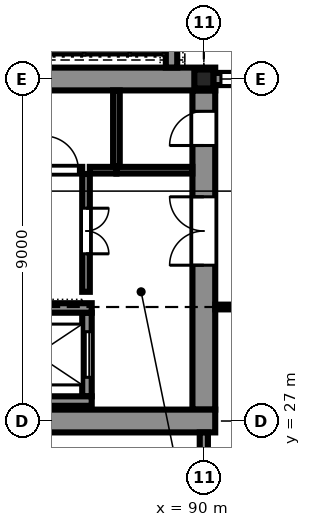
"""IFC4 building model, lengths in metres.
Left out: names, types, materials, properties, quantities, classifications, styles, units other than length and angle.
Written with IfcOpenShell. Run it as: python <this file> out.ifc"""

import sys

from ifc_helpers import new_model, si_unit, direction, frame, frame_2d, origin, origin_2d, place, context, subcontext, project, spatial, polyline, rectangle, hollow_rectangle, outline, extrude, element, fill, save


model = new_model("IFC4")
c1 = context("Model", 3, precision=1e-05, world=origin(), true_north=direction((0.0, 1.0)))
c2 = subcontext(c1, "Body", "Model", "MODEL_VIEW")
j1 = project(units=[si_unit("LENGTHUNIT", "METRE"), si_unit("PLANEANGLEUNIT", "RADIAN")], contexts=[c1])
p1 = place(None, origin())
s1 = spatial("IfcSite", under=j1, at=p1, CompositionType="ELEMENT")
p2 = place(p1, origin())
s2 = spatial("IfcBuilding", under=s1, at=p2, CompositionType="ELEMENT")
p3 = place(p2, origin())
s3 = spatial("IfcBuildingStorey", under=s2, at=p3, CompositionType="ELEMENT", Elevation=0.0)
p4 = place(p3, frame((90.0, 36.0, -2.1), z_axis=(0.0, 0.0, 1.0), x_axis=(1.0, 0.0, 0.0)))
e1 = element("IfcColumn", 1, at=p4, inside=s3, PredefinedType="COLUMN", context=c2, shape_type="SweptSolid", body=[
    extrude(hollow_rectangle(XDim=0.5, YDim=0.5, WallThickness=0.032, at=origin_2d()), origin(), (0.0, 0.0, 1.0), 9.6),
])
p5 = place(p3, frame((71.7, 27.0, -2.1), z_axis=(0.0, 0.0, 1.0), x_axis=(1.0, 0.0, 0.0)))
e2 = element("IfcWall", 2, at=p5, inside=s3, PredefinedType="SOLIDWALL", context=c2, shape_type="SweptSolid", body=[
    extrude(rectangle(XDim=18.6, YDim=0.6, at=frame_2d((9.3, 0.0))), origin(), (0.0, 0.0, 1.0), 9.6),
])
p6 = place(p3, frame((71.7, 36.0, -2.1), z_axis=(0.0, 0.0, 1.0), x_axis=(1.0, 0.0, 0.0)))
e3 = element("IfcWall", 3, at=p6, inside=s3, PredefinedType="SOLIDWALL", context=c2, shape_type="SweptSolid", body=[
    extrude(rectangle(XDim=18.6, YDim=0.6, at=frame_2d((9.3, 0.0))), origin(), (0.0, 0.0, 1.0), 9.6),
])
p7 = place(p6, frame((1.6, 0.0, 2.1)))
e4 = element("IfcOpeningElement", 4, at=p7, cuts=e3, PredefinedType="OPENING", context=c2, shape_type="SweptSolid", body=[
    extrude(rectangle(XDim=1.8, YDim=2.1, at=frame_2d((0.9, 1.05))), frame((0.0, 0.31, 0.0), z_axis=(0.0, -1.0, 0.0), x_axis=(1.0, 0.0, 0.0)), (0.0, 0.0, 1.0), 0.62),
])
p8 = place(p6, frame((5.6, 0.0, 2.1)))
e5 = element("IfcOpeningElement", 5, at=p8, cuts=e3, PredefinedType="OPENING", context=c2, shape_type="SweptSolid", body=[
    extrude(rectangle(XDim=1.8, YDim=2.1, at=frame_2d((0.9, 1.05))), frame((0.0, 0.31, 0.0), z_axis=(0.0, -1.0, 0.0), x_axis=(1.0, 0.0, 0.0)), (0.0, 0.0, 1.0), 0.62),
])
p9 = place(p6, frame((9.1, 0.0, 2.1)))
e6 = element("IfcOpeningElement", 6, at=p9, cuts=e3, PredefinedType="OPENING", context=c2, shape_type="SweptSolid", body=[
    extrude(rectangle(XDim=1.8, YDim=2.1, at=frame_2d((0.9, 1.05))), frame((0.0, 0.31, 0.0), z_axis=(0.0, -1.0, 0.0), x_axis=(1.0, 0.0, 0.0)), (0.0, 0.0, 1.0), 0.62),
])
p10 = place(p3, frame((90.0, 27.3, -2.1), z_axis=(0.0, 0.0, 1.0), x_axis=(0.0, 1.0, 0.0)))
e7 = element("IfcWall", 7, at=p10, inside=s3, PredefinedType="SOLIDWALL", context=c2, shape_type="SweptSolid", body=[
    extrude(rectangle(XDim=8.4, YDim=0.6, at=frame_2d((4.2, 0.0))), origin(), (0.0, 0.0, 1.0), 9.6),
])
p11 = place(p10, frame((3.8, 0.0, 2.1)))
e8 = element("IfcOpeningElement", 8, at=p11, cuts=e7, PredefinedType="OPENING", context=c2, shape_type="SweptSolid", body=[
    extrude(rectangle(XDim=1.8, YDim=2.1, at=frame_2d((0.9, 1.05))), frame((0.0, 0.31, 0.0), z_axis=(0.0, -1.0, 0.0), x_axis=(1.0, 0.0, 0.0)), (0.0, 0.0, 1.0), 0.62),
])
p12 = place(p10, frame((6.95, 0.0, 2.1)))
e9 = element("IfcOpeningElement", 9, at=p12, cuts=e7, PredefinedType="OPENING", context=c2, shape_type="SweptSolid", body=[
    extrude(rectangle(XDim=0.9, YDim=2.1, at=frame_2d((0.45, 1.05))), frame((0.0, 0.31, 0.0), z_axis=(0.0, -1.0, 0.0), x_axis=(1.0, 0.0, 0.0)), (0.0, 0.0, 1.0), 0.62),
])
p13 = place(p3, frame((90.25, 36.0, 0.0), z_axis=(0.0, 0.0, 1.0), x_axis=(1.0, 0.0, 0.0)))
e10 = element("IfcWall", 10, at=p13, inside=s3, PredefinedType="SOLIDWALL", context=c2, shape_type="SweptSolid", body=[
    extrude(rectangle(XDim=8.445, YDim=0.32, at=frame_2d((4.223, 0.0))), origin(), (0.0, 0.0, 1.0), 6.767),
])
p14 = place(p13, frame((3.05, 0.0, 0.0)))
e11 = element("IfcOpeningElement", 11, at=p14, cuts=e10, PredefinedType="OPENING", context=c2, shape_type="SweptSolid", body=[
    extrude(rectangle(XDim=2.4, YDim=3.0, at=frame_2d((1.2, 1.5))), frame((0.0, 0.17, 0.0), z_axis=(0.0, -1.0, 0.0), x_axis=(1.0, 0.0, 0.0)), (0.0, 0.0, 1.0), 0.34),
])
p15 = place(p13, frame((0.2, 0.0, 0.9)))
e12 = element("IfcOpeningElement", 12, at=p15, cuts=e10, PredefinedType="OPENING", context=c2, shape_type="SweptSolid", body=[
    extrude(rectangle(XDim=2.1, YDim=3.0, at=frame_2d((1.05, 1.5))), frame((0.0, 0.17, 0.0), z_axis=(0.0, -1.0, 0.0), x_axis=(1.0, 0.0, 0.0)), (0.0, 0.0, 1.0), 0.34),
])
p16 = place(p13, frame((6.2, 0.0, 0.9)))
e13 = element("IfcOpeningElement", 13, at=p16, cuts=e10, PredefinedType="OPENING", context=c2, shape_type="SweptSolid", body=[
    extrude(rectangle(XDim=2.1, YDim=3.0, at=frame_2d((1.05, 1.5))), frame((0.0, 0.17, 0.0), z_axis=(0.0, -1.0, 0.0), x_axis=(1.0, 0.0, 0.0)), (0.0, 0.0, 1.0), 0.34),
])
p17 = place(p3, frame((89.15, 36.302, 0.0), z_axis=(0.0, 0.0, 1.0), x_axis=(0.0, 1.0, 0.0)))
e14 = element("IfcWall", 14, at=p17, inside=s3, PredefinedType="SOLIDWALL", context=c2, shape_type="SweptSolid", body=[
    extrude(rectangle(XDim=8.098, YDim=0.3, at=frame_2d((4.049, 0.0))), origin(), (0.0, 0.0, 1.0), 6.902),
])
for number, where, z_axis, x_axis in (
    (15, (83.65, 27.525, -1.6), (0.0, 0.0, 1.0), (1.0, 0.0, 0.0)),
    (16, (83.65, 29.975, -1.6), (0.0, 0.0, 1.0), (1.0, 0.0, 0.0)),
):
    element("IfcWall", number, at=place(p3, frame(where, z_axis=z_axis, x_axis=x_axis)), inside=s3, PredefinedType="SOLIDWALL", context=c2, shape_type="SweptSolid", body=[
        extrude(rectangle(XDim=3.4, YDim=0.25, at=frame_2d((1.7, 0.0))), origin(), (0.0, 0.0, 1.0), 8.436),
    ])
p18 = place(p3, frame((86.925, 27.65, -1.6), z_axis=(0.0, 0.0, 1.0), x_axis=(0.0, 1.0, 0.0)))
e17 = element("IfcWall", 17, at=p18, inside=s3, PredefinedType="SOLIDWALL", context=c2, shape_type="SweptSolid", body=[
    extrude(rectangle(XDim=2.2, YDim=0.25, at=frame_2d((1.1, 0.0))), origin(), (0.0, 0.0, 1.0), 8.436),
])
p19 = place(p18, frame((0.5, 0.0, 1.6)))
e18 = element("IfcOpeningElement", 18, at=p19, cuts=e17, PredefinedType="OPENING", context=c2, shape_type="SweptSolid", body=[
    extrude(rectangle(XDim=1.2, YDim=2.1, at=frame_2d((0.6, 1.05))), frame((0.0, 0.135, 0.0), z_axis=(0.0, -1.0, 0.0), x_axis=(1.0, 0.0, 0.0)), (0.0, 0.0, 1.0), 0.27),
])
p20 = place(p3, frame((99.0, 30.0, 0.0), z_axis=(0.0, 0.0, 1.0), x_axis=(-1.0, 0.0, 0.0)))
e19 = element("IfcWall", 19, at=p20, inside=s3, PredefinedType="PARTITIONING", context=c2, shape_type="SweptSolid", body=[
    extrude(rectangle(XDim=8.698, YDim=0.125, at=frame_2d((4.349, 0.0))), origin(), (0.0, 0.0, 1.0), 6.757),
])
p21 = place(p20, frame((3.9, 0.0, 0.0)))
e20 = element("IfcOpeningElement", 20, at=p21, cuts=e19, PredefinedType="OPENING", context=c2, shape_type="SweptSolid", body=[
    extrude(rectangle(XDim=1.2, YDim=2.1, at=frame_2d((0.6, 1.05))), frame((0.0, 0.073, 0.0), z_axis=(0.0, -1.0, 0.0), x_axis=(1.0, 0.0, 0.0)), (0.0, 0.0, 1.0), 0.145),
])
p22 = place(p3, frame((90.0, 26.698, 0.0), z_axis=(0.0, 0.0, 1.0), x_axis=(0.0, -1.0, 0.0)))
e21 = element("IfcWall", 21, at=p22, inside=s3, PredefinedType="PARTITIONING", context=c2, shape_type="SweptSolid", body=[
    extrude(rectangle(XDim=5.591, YDim=0.215, at=frame_2d((2.795, 0.0))), origin(), (0.0, 0.0, 1.0), 6.6),
])
p23 = place(p3, frame((86.9, 33.5, 0.0), z_axis=(0.0, 0.0, 1.0), x_axis=(0.0, -1.0, 0.0)))
e22 = element("IfcWall", 22, at=p23, inside=s3, PredefinedType="PARTITIONING", context=c2, shape_type="SweptSolid", body=[
    extrude(rectangle(XDim=3.1, YDim=0.2, at=frame_2d((1.55, 0.0))), origin(), (0.0, 0.0, 1.0), 6.6),
])
p24 = place(p23, frame((0.9, 0.0, 0.0)))
e23 = element("IfcOpeningElement", 23, at=p24, cuts=e22, PredefinedType="OPENING", context=c2, shape_type="SweptSolid", body=[
    extrude(rectangle(XDim=1.2, YDim=2.1, at=frame_2d((0.6, 1.05))), frame((0.0, 0.11, 0.0), z_axis=(0.0, -1.0, 0.0), x_axis=(1.0, 0.0, 0.0)), (0.0, 0.0, 1.0), 0.22),
])
p25 = place(p3, frame((85.7, 33.6, 0.0), z_axis=(0.0, 0.0, 1.0), x_axis=(1.0, 0.0, 0.0)))
e24 = element("IfcWall", 24, at=p25, inside=s3, PredefinedType="PARTITIONING", context=c2, shape_type="SweptSolid", body=[
    extrude(rectangle(XDim=1.1, YDim=0.175, at=frame_2d((0.55, 0.0))), origin(), (0.0, 0.0, 1.0), 6.459),
])
p26 = place(p25, frame((0.1, 0.0, 0.0)))
e25 = element("IfcOpeningElement", 25, at=p26, cuts=e24, PredefinedType="OPENING", context=c2, shape_type="SweptSolid", body=[
    extrude(rectangle(XDim=0.9, YDim=2.1, at=frame_2d((0.45, 1.05))), frame((0.0, 0.097, 0.0), z_axis=(0.0, -1.0, 0.0), x_axis=(1.0, 0.0, 0.0)), (0.0, 0.0, 1.0), 0.195),
])
p27 = place(p3, frame((87.7, 33.6, 0.0), z_axis=(0.0, 0.0, 1.0), x_axis=(1.0, 0.0, 0.0)))
e26 = element("IfcWall", 26, at=p27, inside=s3, PredefinedType="PARTITIONING", context=c2, shape_type="SweptSolid", body=[
    extrude(rectangle(XDim=1.998, YDim=0.175, at=frame_2d((0.999, 0.0))), origin(), (0.0, 0.0, 1.0), 6.459),
])
p28 = place(p3, frame((87.0, 33.6, 0.0), z_axis=(0.0, 0.0, 1.0), x_axis=(1.0, 0.0, 0.0)))
e27 = element("IfcWall", 27, at=p28, inside=s3, PredefinedType="PARTITIONING", context=c2, shape_type="SweptSolid", body=[
    extrude(rectangle(XDim=0.7, YDim=0.175, at=frame_2d((0.35, 0.0))), origin(), (0.0, 0.0, 1.0), 6.459),
])
p29 = place(p3, frame((87.7, 35.698, 0.0), z_axis=(0.0, 0.0, 1.0), x_axis=(0.0, -1.0, 0.0)))
e28 = element("IfcWall", 28, at=p29, inside=s3, PredefinedType="PARTITIONING", context=c2, shape_type="SweptSolid", body=[
    extrude(rectangle(XDim=1.998, YDim=0.175, at=frame_2d((0.999, 0.0))), origin(), (0.0, 0.0, 1.0), 6.459),
])
p30 = place(p15, origin())
e29 = element("IfcWindow", 29, at=p30, inside=s3, PartitioningType="DOUBLE_PANEL_VERTICAL", PredefinedType="WINDOW", context=c2, shape_type="SweptSolid", body=[
    extrude(outline(polyline([(0.0, 0.0), (2.1, 0.0), (2.1, 3.0), (0.0, 3.0), (0.0, 0.0)]), holes=[polyline([(0.07, 0.07), (2.03, 0.07), (2.03, 2.93), (0.07, 2.93), (0.07, 0.07)])]), frame((0.0, 0.03, 0.0), z_axis=(0.0, -1.0, 0.0), x_axis=(1.0, 0.0, 0.0)), (0.0, 0.0, 1.0), 0.06),
    extrude(rectangle(XDim=0.04, YDim=2.86, at=frame_2d((1.05, 1.5))), frame((0.0, 0.022, 0.0), z_axis=(0.0, -1.0, 0.0), x_axis=(1.0, 0.0, 0.0)), (0.0, 0.0, 1.0), 0.044),
    extrude(outline(polyline([(0.07, 0.07), (1.03, 0.07), (1.03, 2.93), (0.07, 2.93), (0.07, 0.07)]), holes=[polyline([(0.1, 0.1), (1.0, 0.1), (1.0, 2.9), (0.1, 2.9), (0.1, 0.1)])]), frame((0.0, 0.022, 0.0), z_axis=(0.0, -1.0, 0.0), x_axis=(1.0, 0.0, 0.0)), (0.0, 0.0, 1.0), 0.045),
    extrude(rectangle(XDim=0.9, YDim=2.8, at=frame_2d((0.55, 1.5))), frame((0.0, 0.006, 0.0), z_axis=(0.0, -1.0, 0.0), x_axis=(1.0, 0.0, 0.0)), (0.0, 0.0, 1.0), 0.012),
    extrude(outline(polyline([(1.07, 0.07), (2.03, 0.07), (2.03, 2.93), (1.07, 2.93), (1.07, 0.07)]), holes=[polyline([(1.1, 0.1), (2.0, 0.1), (2.0, 2.9), (1.1, 2.9), (1.1, 0.1)])]), frame((0.0, 0.022, 0.0), z_axis=(0.0, -1.0, 0.0), x_axis=(1.0, 0.0, 0.0)), (0.0, 0.0, 1.0), 0.045),
    extrude(rectangle(XDim=0.9, YDim=2.8, at=frame_2d((1.55, 1.5))), frame((0.0, 0.006, 0.0), z_axis=(0.0, -1.0, 0.0), x_axis=(1.0, 0.0, 0.0)), (0.0, 0.0, 1.0), 0.012),
])
fill(e12, e29)
p31 = place(p19, origin())
e30 = element("IfcDoor", 30, at=p31, inside=s3, OperationType="SLIDING_TO_LEFT", PredefinedType="DOOR", context=c2, shape_type="SweptSolid", body=[
    extrude(outline(polyline([(0.0, 0.0), (0.07, 0.0), (0.07, 2.03), (1.13, 2.03), (1.13, 0.0), (1.2, 0.0), (1.2, 2.1), (0.0, 2.1), (0.0, 0.0)])), frame((0.0, 0.025, 0.0), z_axis=(0.0, -1.0, 0.0), x_axis=(1.0, 0.0, 0.0)), (0.0, 0.0, 1.0), 0.05),
    extrude(rectangle(XDim=0.579, YDim=2.016, at=frame_2d((0.363, 1.018))), frame((0.0, 0.018, 0.0), z_axis=(0.0, -1.0, 0.0), x_axis=(1.0, 0.0, 0.0)), (0.0, 0.0, 1.0), 0.016),
    extrude(rectangle(XDim=0.575, YDim=2.016, at=frame_2d((0.839, 1.018))), frame((0.0, -0.002, 0.0), z_axis=(0.0, -1.0, 0.0), x_axis=(1.0, 0.0, 0.0)), (0.0, 0.0, 1.0), 0.016),
])
fill(e18, e30)
p32 = place(p24, origin())
e31 = element("IfcDoor", 31, at=p32, inside=s3, OperationType="DOUBLE_DOOR_SINGLE_SWING", PredefinedType="DOOR", context=c2, shape_type="SweptSolid", body=[
    extrude(outline(polyline([(0.0, 0.0), (0.07, 0.0), (0.07, 2.03), (1.13, 2.03), (1.13, 0.0), (1.2, 0.0), (1.2, 2.1), (0.0, 2.1), (0.0, 0.0)])), frame((0.0, 0.025, 0.0), z_axis=(0.0, -1.0, 0.0), x_axis=(1.0, 0.0, 0.0)), (0.0, 0.0, 1.0), 0.05),
    extrude(outline(polyline([(0.074, 0.01), (0.597, 0.01), (0.597, 2.026), (0.074, 2.026), (0.074, 0.01)]), holes=[polyline([(0.178, 0.373), (0.492, 0.373), (0.492, 1.784), (0.178, 1.784), (0.178, 0.373)])]), frame((0.0, 0.017, 0.0), z_axis=(0.0, -1.0, 0.0), x_axis=(1.0, 0.0, 0.0)), (0.0, 0.0, 1.0), 0.035),
    extrude(rectangle(XDim=0.314, YDim=1.411, at=frame_2d((0.335, 1.079))), frame((0.0, 0.009, 0.0), z_axis=(0.0, -1.0, 0.0), x_axis=(1.0, 0.0, 0.0)), (0.0, 0.0, 1.0), 0.017),
    extrude(outline(polyline([(0.603, 0.01), (1.126, 0.01), (1.126, 2.026), (0.603, 2.026), (0.603, 0.01)]), holes=[polyline([(0.708, 0.373), (1.021, 0.373), (1.021, 1.784), (0.708, 1.784), (0.708, 0.373)])]), frame((0.0, 0.017, 0.0), z_axis=(0.0, -1.0, 0.0), x_axis=(1.0, 0.0, 0.0)), (0.0, 0.0, 1.0), 0.035),
    extrude(rectangle(XDim=0.314, YDim=1.411, at=frame_2d((0.865, 1.079))), frame((0.0, 0.009, 0.0), z_axis=(0.0, -1.0, 0.0), x_axis=(1.0, 0.0, 0.0)), (0.0, 0.0, 1.0), 0.017),
])
fill(e23, e31)
p33 = place(p11, origin())
e32 = element("IfcDoor", 32, at=p33, inside=s3, OperationType="DOUBLE_DOOR_SINGLE_SWING", PredefinedType="DOOR", context=c2, shape_type="SweptSolid", body=[
    extrude(outline(polyline([(0.0, 0.0), (0.07, 0.0), (0.07, 2.03), (1.73, 2.03), (1.73, 0.0), (1.8, 0.0), (1.8, 2.1), (0.0, 2.1), (0.0, 0.0)])), frame((0.0, 0.025, 0.0), z_axis=(0.0, -1.0, 0.0), x_axis=(1.0, 0.0, 0.0)), (0.0, 0.0, 1.0), 0.05),
    extrude(outline(polyline([(0.074, 0.01), (0.897, 0.01), (0.897, 2.026), (0.074, 2.026), (0.074, 0.01)]), holes=[polyline([(0.194, 0.16), (0.777, 0.16), (0.777, 1.01), (0.194, 1.01), (0.194, 0.16)]), polyline([(0.335, 1.16), (0.635, 1.16), (0.635, 1.76), (0.335, 1.76), (0.335, 1.16)])]), frame((0.0, 0.017, 0.0), z_axis=(0.0, -1.0, 0.0), x_axis=(1.0, 0.0, 0.0)), (0.0, 0.0, 1.0), 0.035),
    extrude(rectangle(XDim=0.583, YDim=0.85, at=frame_2d((0.485, 0.585))), frame((0.0, 0.009, 0.0), z_axis=(0.0, -1.0, 0.0), x_axis=(1.0, 0.0, 0.0)), (0.0, 0.0, 1.0), 0.017),
    extrude(rectangle(XDim=0.3, YDim=0.6, at=frame_2d((0.485, 1.46))), frame((0.0, 0.006, 0.0), z_axis=(0.0, -1.0, 0.0), x_axis=(1.0, 0.0, 0.0)), (0.0, 0.0, 1.0), 0.012),
    extrude(outline(polyline([(0.903, 0.01), (1.726, 0.01), (1.726, 2.026), (0.903, 2.026), (0.903, 0.01)]), holes=[polyline([(1.023, 0.16), (1.606, 0.16), (1.606, 1.01), (1.023, 1.01), (1.023, 0.16)]), polyline([(1.165, 1.16), (1.465, 1.16), (1.465, 1.76), (1.165, 1.76), (1.165, 1.16)])]), frame((0.0, 0.017, 0.0), z_axis=(0.0, -1.0, 0.0), x_axis=(1.0, 0.0, 0.0)), (0.0, 0.0, 1.0), 0.035),
    extrude(rectangle(XDim=0.583, YDim=0.85, at=frame_2d((1.314, 0.585))), frame((0.0, 0.009, 0.0), z_axis=(0.0, -1.0, 0.0), x_axis=(1.0, 0.0, 0.0)), (0.0, 0.0, 1.0), 0.017),
    extrude(rectangle(XDim=0.3, YDim=0.6, at=frame_2d((1.314, 1.46))), frame((0.0, 0.006, 0.0), z_axis=(0.0, -1.0, 0.0), x_axis=(1.0, 0.0, 0.0)), (0.0, 0.0, 1.0), 0.012),
])
fill(e8, e32)
p34 = place(p26, origin())
e33 = element("IfcDoor", 33, at=p34, inside=s3, OperationType="SINGLE_SWING_LEFT", PredefinedType="DOOR", context=c2, shape_type="SweptSolid", body=[
    extrude(outline(polyline([(0.0, 0.0), (0.07, 0.0), (0.07, 2.03), (0.83, 2.03), (0.83, 0.0), (0.9, 0.0), (0.9, 2.1), (0.0, 2.1), (0.0, 0.0)])), frame((0.0, 0.025, 0.0), z_axis=(0.0, -1.0, 0.0), x_axis=(1.0, 0.0, 0.0)), (0.0, 0.0, 1.0), 0.05),
    extrude(outline(polyline([(0.074, 0.01), (0.826, 0.01), (0.826, 2.026), (0.074, 2.026), (0.074, 0.01)]), holes=[polyline([(0.194, 0.16), (0.706, 0.16), (0.706, 1.01), (0.194, 1.01), (0.194, 0.16)]), polyline([(0.3, 1.16), (0.6, 1.16), (0.6, 1.76), (0.3, 1.76), (0.3, 1.16)])]), frame((0.0, 0.017, 0.0), z_axis=(0.0, -1.0, 0.0), x_axis=(1.0, 0.0, 0.0)), (0.0, 0.0, 1.0), 0.035),
    extrude(rectangle(XDim=0.512, YDim=0.85, at=frame_2d((0.45, 0.585))), frame((0.0, 0.009, 0.0), z_axis=(0.0, -1.0, 0.0), x_axis=(1.0, 0.0, 0.0)), (0.0, 0.0, 1.0), 0.017),
    extrude(rectangle(XDim=0.3, YDim=0.6, at=frame_2d((0.45, 1.46))), frame((0.0, 0.006, 0.0), z_axis=(0.0, -1.0, 0.0), x_axis=(1.0, 0.0, 0.0)), (0.0, 0.0, 1.0), 0.012),
])
fill(e25, e33)
p35 = place(p12, origin())
e34 = element("IfcDoor", 34, at=p35, inside=s3, OperationType="SINGLE_SWING_LEFT", PredefinedType="DOOR", context=c2, shape_type="SweptSolid", body=[
    extrude(outline(polyline([(0.0, 0.0), (0.07, 0.0), (0.07, 2.03), (0.83, 2.03), (0.83, 0.0), (0.9, 0.0), (0.9, 2.1), (0.0, 2.1), (0.0, 0.0)])), frame((0.0, 0.025, 0.0), z_axis=(0.0, -1.0, 0.0), x_axis=(1.0, 0.0, 0.0)), (0.0, 0.0, 1.0), 0.05),
    extrude(outline(polyline([(0.074, 0.01), (0.826, 0.01), (0.826, 2.026), (0.074, 2.026), (0.074, 0.01)]), holes=[polyline([(0.194, 0.16), (0.706, 0.16), (0.706, 1.01), (0.194, 1.01), (0.194, 0.16)]), polyline([(0.3, 1.16), (0.6, 1.16), (0.6, 1.76), (0.3, 1.76), (0.3, 1.16)])]), frame((0.0, 0.017, 0.0), z_axis=(0.0, -1.0, 0.0), x_axis=(1.0, 0.0, 0.0)), (0.0, 0.0, 1.0), 0.035),
    extrude(rectangle(XDim=0.512, YDim=0.85, at=frame_2d((0.45, 0.585))), frame((0.0, 0.009, 0.0), z_axis=(0.0, -1.0, 0.0), x_axis=(1.0, 0.0, 0.0)), (0.0, 0.0, 1.0), 0.017),
    extrude(rectangle(XDim=0.3, YDim=0.6, at=frame_2d((0.45, 1.46))), frame((0.0, 0.006, 0.0), z_axis=(0.0, -1.0, 0.0), x_axis=(1.0, 0.0, 0.0)), (0.0, 0.0, 1.0), 0.012),
])
fill(e9, e34)
save(model, sys.argv[1])
